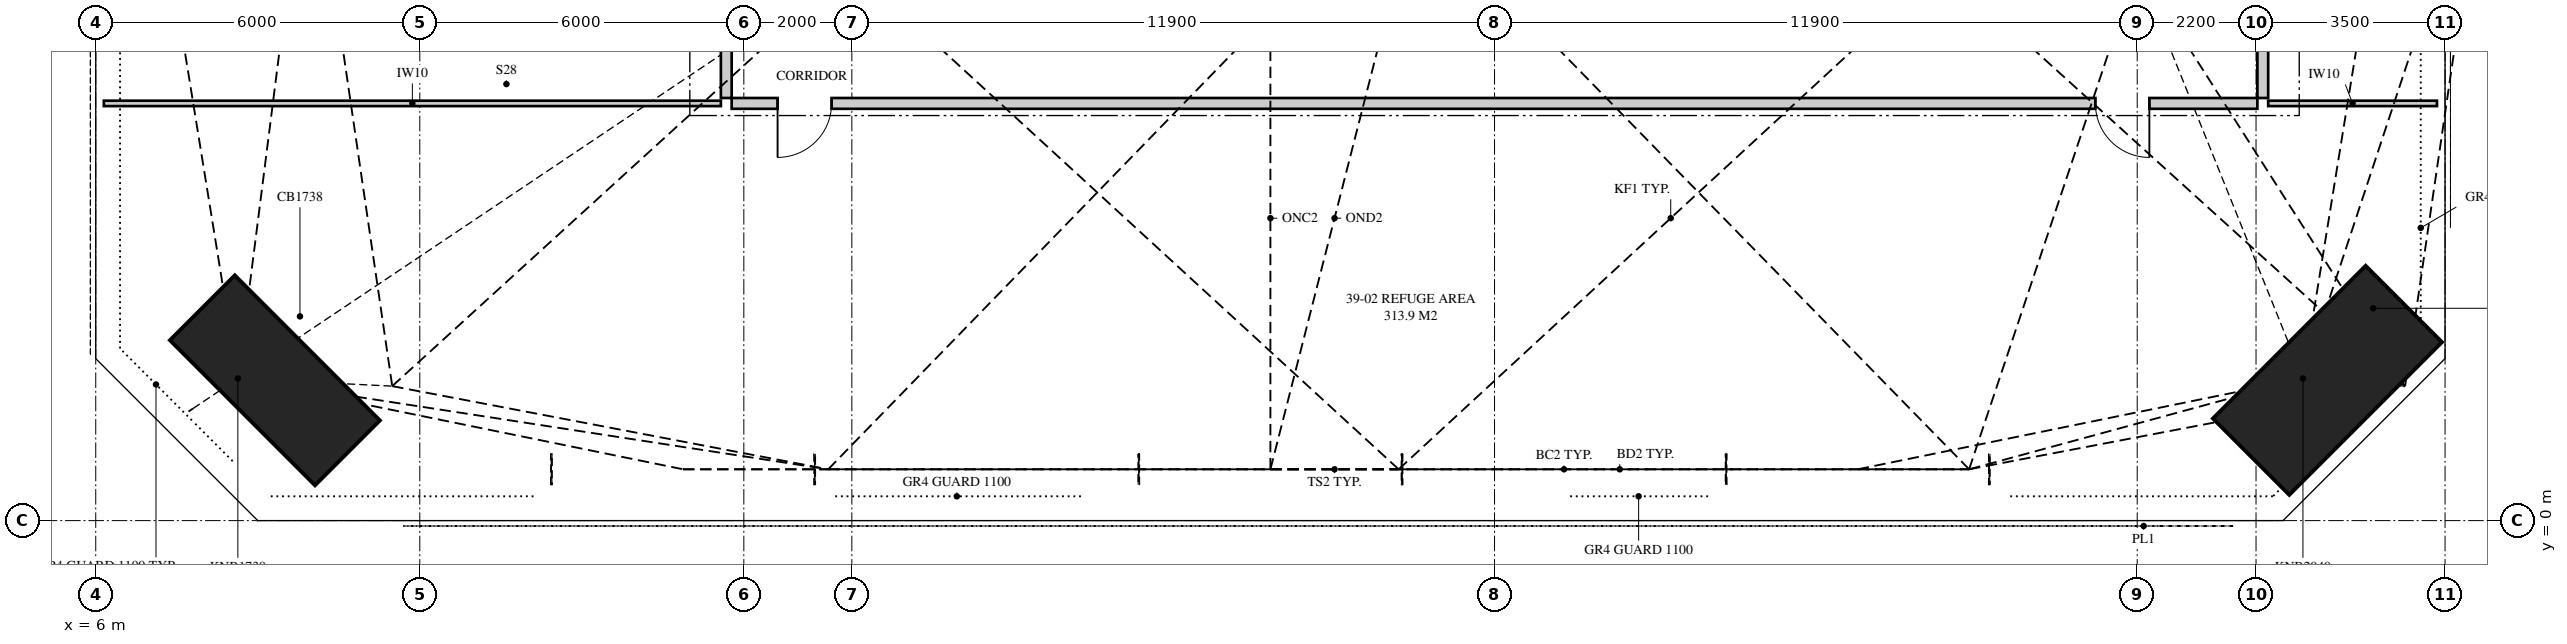
"""IFC4 building model, lengths in metres.
Left out: names, types, materials, properties, quantities, classifications, styles, units other than length and angle.
Written with IfcOpenShell. Run it as: python <this file> out.ifc"""

import sys

from ifc_helpers import new_model, si_unit, direction, frame, frame_2d, origin, origin_2d, place, context, subcontext, project, spatial, polyline, rectangle, hollow_rectangle, outline, extrude, element, fill, save


model = new_model("IFC4")
c1 = context("Model", 3, precision=1e-05, world=origin(), true_north=direction((0.0, 1.0)))
c2 = subcontext(c1, "Body", "Model", "MODEL_VIEW")
j1 = project(units=[si_unit("LENGTHUNIT", "METRE"), si_unit("PLANEANGLEUNIT", "RADIAN")], contexts=[c1])
p1 = place(None, origin())
s1 = spatial("IfcSite", under=j1, at=p1, CompositionType="ELEMENT")
p2 = place(p1, origin())
s2 = spatial("IfcBuilding", under=s1, at=p2, CompositionType="ELEMENT")
p3 = place(p2, frame((0.0, 0.0, 144.35)))
s3 = spatial("IfcBuildingStorey", under=s2, at=p3, CompositionType="ELEMENT", Elevation=144.35)
p4 = place(p3, frame((9.205, 2.603, 1.003), z_axis=(0.496185797587, -0.024535961807, 0.86786959899), x_axis=(0.574504419139, 0.758742156572, -0.30700979175)))
e1 = element("IfcColumn", 1, at=p4, inside=s3, PredefinedType="COLUMN", context=c2, shape_type="SweptSolid", body=[
    extrude(hollow_rectangle(XDim=1.7, YDim=3.8, WallThickness=0.125, at=origin_2d()), origin(), (0.0, 0.0, 1.0), 4.605),
])
p5 = place(p3, frame((47.149, 2.61, 0.741), z_axis=(0.353681007575, -0.026433626357, 0.934992517766), x_axis=(-0.635447068819, 0.726725043454, 0.260917101675)))
e2 = element("IfcColumn", 2, at=p5, inside=s3, PredefinedType="COLUMN", context=c2, shape_type="SweptSolid", body=[
    extrude(hollow_rectangle(XDim=2.0, YDim=4.0, WallThickness=0.125, at=origin_2d()), origin(), (0.0, 0.0, 1.0), 4.555),
])
p6 = place(p3, frame((17.775, 7.725, 0.0), z_axis=(0.0, 0.0, 1.0), x_axis=(1.0, 0.0, 0.0)))
e3 = element("IfcWall", 3, at=p6, inside=s3, PredefinedType="PARTITIONING", context=c2, shape_type="SweptSolid", body=[
    extrude(outline(polyline([(28.25, 0.0), (28.25, 4.72), (27.983, 4.72), (27.983, 4.141), (27.295, 4.141), (27.295, 4.72), (25.672, 4.72), (25.672, 4.141), (24.748, 4.141), (24.748, 4.72), (20.146, 4.72), (20.146, 4.141), (19.233, 4.141), (19.233, 4.72), (16.72, 4.72), (16.72, 4.141), (15.864, 4.141), (15.864, 4.72), (12.635, 4.72), (12.635, 4.208), (12.065, 4.208), (12.065, 4.72), (8.798, 4.72), (8.798, 4.141), (7.945, 4.141), (7.945, 4.72), (5.432, 4.72), (5.432, 4.141), (4.516, 4.141), (4.516, 4.72), (0.0, 4.72), (0.0, 0.0), (26.463, 0.0), (26.463, 2.2), (27.621, 2.2), (27.621, 0.0), (28.25, 0.0)]), holes=[polyline([(11.405, 3.239), (11.459, 3.353), (12.006, 3.423), (12.006, 2.917), (11.951, 2.803), (11.405, 2.732), (11.405, 3.239)])]), frame((0.0, 0.1, 0.0), z_axis=(0.0, -1.0, 0.0), x_axis=(1.0, 0.0, 0.0)), (0.0, 0.0, 1.0), 0.2),
])
p7 = place(p6, frame((0.85, 0.0, 0.0)))
e4 = element("IfcOpeningElement", 4, at=p7, cuts=e3, PredefinedType="OPENING", context=c2, shape_type="SweptSolid", body=[
    extrude(rectangle(XDim=1.0, YDim=2.1, at=frame_2d((0.5, 1.05))), frame((0.0, 0.11, 0.0), z_axis=(0.0, -1.0, 0.0), x_axis=(1.0, 0.0, 0.0)), (0.0, 0.0, 1.0), 0.22),
])
p8 = place(p6, frame((25.25, 0.0, 0.0)))
e5 = element("IfcOpeningElement", 5, at=p8, cuts=e3, PredefinedType="OPENING", context=c2, shape_type="SweptSolid", body=[
    extrude(rectangle(XDim=1.0, YDim=2.1, at=frame_2d((0.5, 1.05))), frame((0.0, 0.11, 0.0), z_axis=(0.0, -1.0, 0.0), x_axis=(1.0, 0.0, 0.0)), (0.0, 0.0, 1.0), 0.22),
])
p9 = place(p3, frame((17.675, 7.825, 0.0), z_axis=(0.0, 0.0, 1.0), x_axis=(0.0, 1.0, 0.0)))
e6 = element("IfcWall", 6, at=p9, inside=s3, PredefinedType="PARTITIONING", context=c2, shape_type="SweptSolid", body=[
    extrude(outline(polyline([(1.55, 2.2), (1.55, 4.72), (0.716, 4.72), (0.716, 4.141), (0.0, 4.141), (0.0, 0.0), (0.198, 0.0), (0.198, 2.2), (1.55, 2.2)])), frame((0.0, 0.1, 0.0), z_axis=(0.0, -1.0, 0.0), x_axis=(1.0, 0.0, 0.0)), (0.0, 0.0, 1.0), 0.2),
])
p10 = place(p3, frame((46.125, 7.825, 0.0), z_axis=(0.0, 0.0, 1.0), x_axis=(0.0, 1.0, 0.0)))
e7 = element("IfcWall", 7, at=p10, inside=s3, PredefinedType="PARTITIONING", context=c2, shape_type="SweptSolid", body=[
    extrude(rectangle(XDim=1.55, YDim=0.2, at=frame_2d((0.775, 0.0))), origin(), (0.0, 0.0, 1.0), 4.72),
])
p11 = place(p3, frame((6.15, 7.725, 0.0), z_axis=(0.0, 0.0, 1.0), x_axis=(1.0, 0.0, 0.0)))
e8 = element("IfcWall", 8, at=p11, inside=s3, PredefinedType="PARTITIONING", context=c2, shape_type="SweptSolid", body=[
    extrude(outline(polyline([(11.055, 0.0), (11.425, 0.0), (11.425, 4.141), (10.676, 4.141), (10.676, 4.72), (5.288, 4.72), (5.288, 3.32), (3.858, 3.32), (3.858, 4.72), (0.0, 4.72), (0.0, 0.0), (9.109, 0.0), (9.109, 2.2), (11.055, 2.2), (11.055, 0.0)]), holes=[polyline([(2.508, 0.74), (2.508, 2.082), (2.523, 2.138), (3.75, 2.212), (3.75, 0.87), (3.736, 0.814), (2.508, 0.74)])]), frame((0.0, 0.05, 0.0), z_axis=(0.0, -1.0, 0.0), x_axis=(1.0, 0.0, 0.0)), (0.0, 0.0, 1.0), 0.1),
])
p12 = place(p3, frame((46.225, 7.725, 0.0), z_axis=(0.0, 0.0, 1.0), x_axis=(1.0, 0.0, 0.0)))
e9 = element("IfcWall", 9, at=p12, inside=s3, PredefinedType="PARTITIONING", context=c2, shape_type="SweptSolid", body=[
    extrude(outline(polyline([(0.0, 0.0), (3.125, 0.0), (3.125, 3.32), (2.587, 3.32), (2.587, 4.72), (0.0, 4.72), (0.0, 0.0)]), holes=[polyline([(2.95, 0.874), (1.671, 0.69), (1.671, 2.024), (1.708, 2.079), (2.988, 2.263), (2.988, 0.928), (2.95, 0.874)])]), frame((0.0, 0.05, 0.0), z_axis=(0.0, -1.0, 0.0), x_axis=(1.0, 0.0, 0.0)), (0.0, 0.0, 1.0), 0.1),
])
p13 = place(p7, frame((1.0, 0.0, 0.0), z_axis=(0.0, 0.0, 1.0), x_axis=(-1.0, 0.0, 0.0)))
e10 = element("IfcDoor", 10, at=p13, inside=s3, OperationType="SINGLE_SWING_RIGHT", PredefinedType="DOOR", context=c2, shape_type="SweptSolid", body=[
    extrude(rectangle(XDim=1.0, YDim=2.1, at=frame_2d((0.5, 1.05))), frame((0.0, 0.025, 0.0), z_axis=(0.0, -1.0, 0.0), x_axis=(1.0, 0.0, 0.0)), (0.0, 0.0, 1.0), 0.05),
])
fill(e4, e10)
p14 = place(p8, frame((1.0, 0.0, 0.0), z_axis=(0.0, 0.0, 1.0), x_axis=(-1.0, 0.0, 0.0)))
e11 = element("IfcDoor", 11, at=p14, inside=s3, OperationType="SINGLE_SWING_LEFT", PredefinedType="DOOR", context=c2, shape_type="SweptSolid", body=[
    extrude(rectangle(XDim=1.0, YDim=2.1, at=frame_2d((0.5, 1.05))), frame((0.0, 0.025, 0.0), z_axis=(0.0, -1.0, 0.0), x_axis=(1.0, 0.0, 0.0)), (0.0, 0.0, 1.0), 0.05),
])
fill(e5, e11)
save(model, sys.argv[1])
